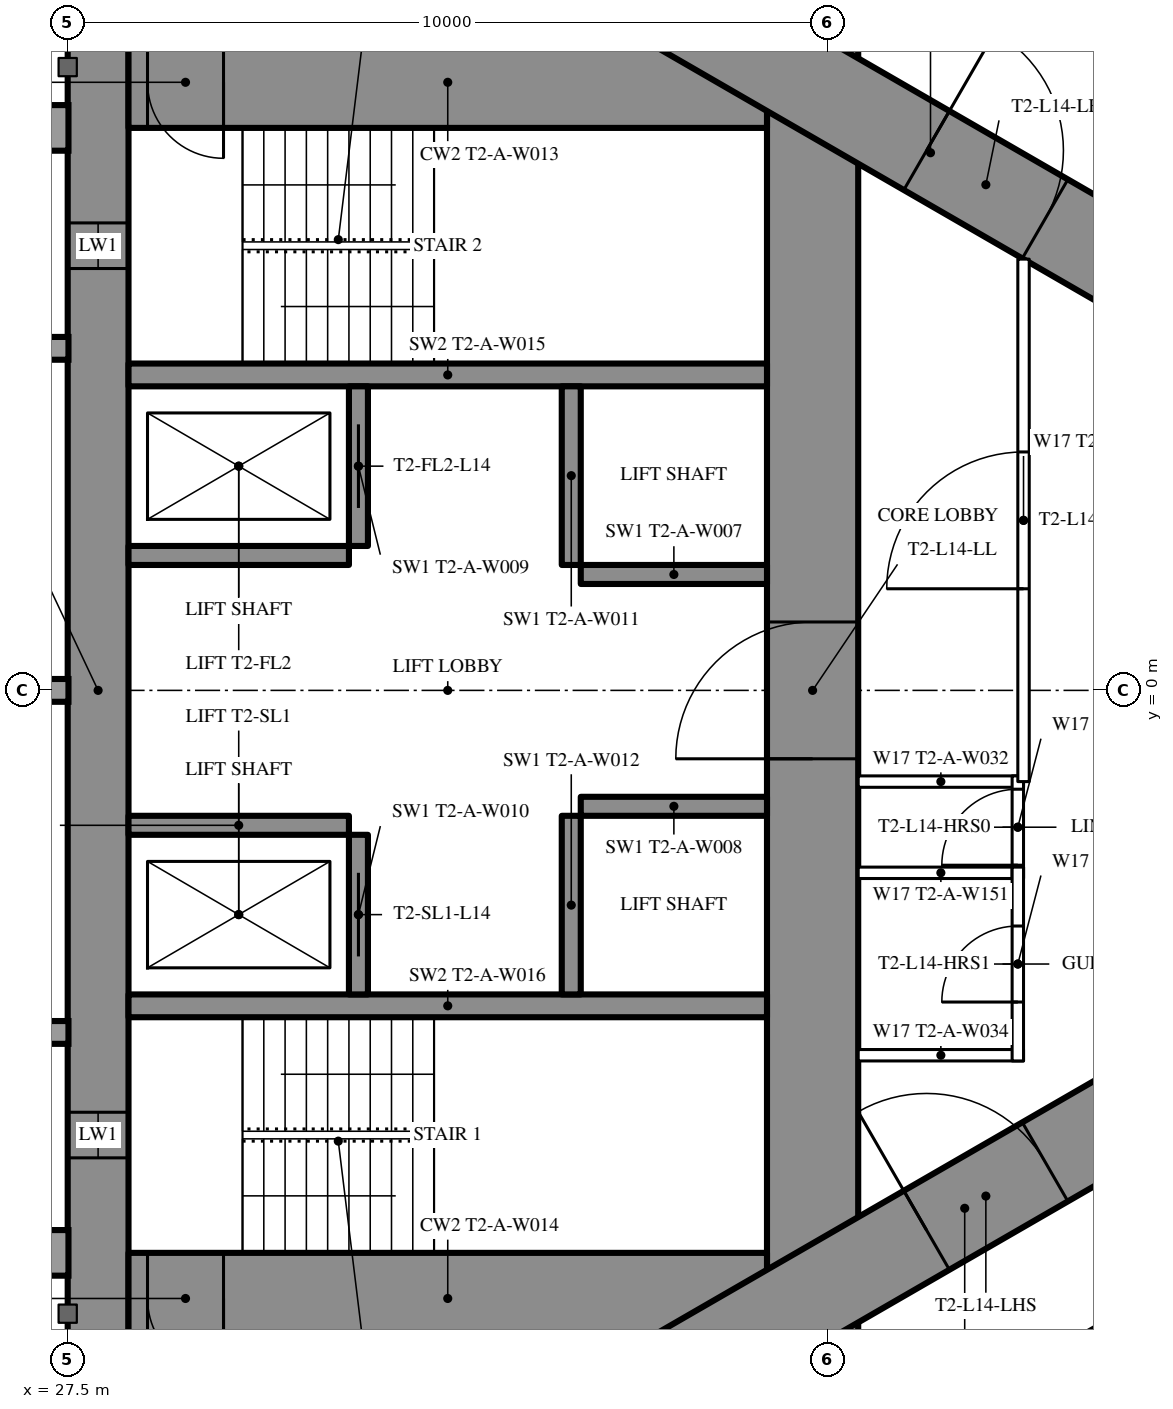
"""IFC4 building model, lengths in metres.
Left out: names, types, materials, properties, quantities, classifications, styles, units other than length and angle.
Written with IfcOpenShell. Run it as: python <this file> out.ifc"""

import sys

from ifc_helpers import new_model, si_unit, direction, frame, frame_2d, origin, place, context, subcontext, project, spatial, rectangle, extrude, element, fill, save


model = new_model("IFC4")
c1 = context("Model", 3, precision=1e-05, world=origin(), true_north=direction((0.0, 1.0)))
c2 = subcontext(c1, "Body", "Model", "MODEL_VIEW")
j1 = project(units=[si_unit("LENGTHUNIT", "METRE"), si_unit("PLANEANGLEUNIT", "RADIAN")], contexts=[c1])
p1 = place(None, origin())
s1 = spatial("IfcSite", under=j1, at=p1, CompositionType="ELEMENT")
p2 = place(p1, origin())
s2 = spatial("IfcBuilding", under=s1, at=p2, CompositionType="ELEMENT")
p3 = place(p2, frame((0.0, 0.0, 56.5)))
s3 = spatial("IfcBuildingStorey", under=s2, at=p3, CompositionType="ELEMENT", Elevation=56.5)
p4 = place(p3, frame((27.9, -8.6, 0.0), z_axis=(0.0, 0.0, 1.0), x_axis=(0.0, 1.0, 0.0)))
e1 = element("IfcWall", 1, at=p4, inside=s3, PredefinedType="SHEAR", context=c2, shape_type="SweptSolid", body=[
    extrude(rectangle(XDim=17.2, YDim=0.8, at=frame_2d((8.6, 0.0))), origin(), (0.0, 0.0, 1.0), 3.5),
])
p5 = place(p4, frame((2.45, 0.0, 0.6)))
e2 = element("IfcOpeningElement", 2, at=p5, cuts=e1, PredefinedType="OPENING", context=c2, shape_type="SweptSolid", body=[
    extrude(rectangle(XDim=0.6, YDim=2.1, at=frame_2d((0.3, 1.05))), frame((0.0, 0.41, 0.0), z_axis=(0.0, -1.0, 0.0), x_axis=(1.0, 0.0, 0.0)), (0.0, 0.0, 1.0), 0.82),
])
p6 = place(p4, frame((14.15, 0.0, 0.6)))
e3 = element("IfcOpeningElement", 3, at=p6, cuts=e1, PredefinedType="OPENING", context=c2, shape_type="SweptSolid", body=[
    extrude(rectangle(XDim=0.6, YDim=2.1, at=frame_2d((0.3, 1.05))), frame((0.0, 0.41, 0.0), z_axis=(0.0, -1.0, 0.0), x_axis=(1.0, 0.0, 0.0)), (0.0, 0.0, 1.0), 0.82),
])
p7 = place(p3, frame((37.3, -8.6, 0.0), z_axis=(0.0, 0.0, 1.0), x_axis=(0.0, 1.0, 0.0)))
e4 = element("IfcWall", 4, at=p7, inside=s3, PredefinedType="SHEAR", context=c2, shape_type="SweptSolid", body=[
    extrude(rectangle(XDim=17.2, YDim=1.2, at=frame_2d((8.6, 0.0))), origin(), (0.0, 0.0, 1.0), 3.5),
])
p8 = place(p7, frame((7.7, 0.0, 0.0)))
e5 = element("IfcOpeningElement", 5, at=p8, cuts=e4, PredefinedType="OPENING", context=c2, shape_type="SweptSolid", body=[
    extrude(rectangle(XDim=1.8, YDim=2.2, at=frame_2d((0.9, 1.1))), frame((0.0, 0.61, 0.0), z_axis=(0.0, -1.0, 0.0), x_axis=(1.0, 0.0, 0.0)), (0.0, 0.0, 1.0), 1.22),
])
p9 = place(p3, frame((28.3, -8.0, 0.0), z_axis=(0.0, 0.0, 1.0), x_axis=(1.0, 0.0, 0.0)))
e6 = element("IfcWall", 6, at=p9, inside=s3, PredefinedType="SHEAR", context=c2, shape_type="SweptSolid", body=[
    extrude(rectangle(XDim=8.4, YDim=1.2, at=frame_2d((4.2, 0.0))), origin(), (0.0, 0.0, 1.0), 3.5),
])
p10 = place(p9, frame((0.25, 0.0, 0.0)))
e7 = element("IfcOpeningElement", 7, at=p10, cuts=e6, PredefinedType="OPENING", context=c2, shape_type="SweptSolid", body=[
    extrude(rectangle(XDim=1.0, YDim=2.2, at=frame_2d((0.5, 1.1))), frame((0.0, 0.61, 0.0), z_axis=(0.0, -1.0, 0.0), x_axis=(1.0, 0.0, 0.0)), (0.0, 0.0, 1.0), 1.22),
])
p11 = place(p3, frame((28.3, 8.0, 0.0), z_axis=(0.0, 0.0, 1.0), x_axis=(1.0, 0.0, 0.0)))
e8 = element("IfcWall", 8, at=p11, inside=s3, PredefinedType="SHEAR", context=c2, shape_type="SweptSolid", body=[
    extrude(rectangle(XDim=8.4, YDim=1.2, at=frame_2d((4.2, 0.0))), origin(), (0.0, 0.0, 1.0), 3.5),
])
p12 = place(p11, frame((0.25, 0.0, 0.0)))
e9 = element("IfcOpeningElement", 9, at=p12, cuts=e8, PredefinedType="OPENING", context=c2, shape_type="SweptSolid", body=[
    extrude(rectangle(XDim=1.0, YDim=2.2, at=frame_2d((0.5, 1.1))), frame((0.0, 0.61, 0.0), z_axis=(0.0, -1.0, 0.0), x_axis=(1.0, 0.0, 0.0)), (0.0, 0.0, 1.0), 1.22),
])
for number, where, z_axis, x_axis in (
    (10, (28.3, -4.15, 0.0), (0.0, 0.0, 1.0), (1.0, 0.0, 0.0)),
    (11, (28.3, 4.15, 0.0), (0.0, 0.0, 1.0), (1.0, 0.0, 0.0)),
):
    element("IfcWall", number, at=place(p3, frame(where, z_axis=z_axis, x_axis=x_axis)), inside=s3, PredefinedType="SHEAR", context=c2, shape_type="SweptSolid", body=[
        extrude(rectangle(XDim=8.4, YDim=0.3, at=frame_2d((4.2, 0.0))), origin(), (0.0, 0.0, 1.0), 3.5),
    ])
p13 = place(p3, frame((31.325, -4.0, 0.0), z_axis=(0.0, 0.0, 1.0), x_axis=(0.0, 1.0, 0.0)))
e12 = element("IfcWall", 12, at=p13, inside=s3, PredefinedType="SHEAR", context=c2, shape_type="SweptSolid", body=[
    extrude(rectangle(XDim=2.1, YDim=0.25, at=frame_2d((1.05, 0.0))), origin(), (0.0, 0.0, 1.0), 3.5),
])
p14 = place(p13, frame((0.5, 0.0, 0.0)))
e13 = element("IfcOpeningElement", 13, at=p14, cuts=e12, PredefinedType="OPENING", context=c2, shape_type="SweptSolid", body=[
    extrude(rectangle(XDim=1.1, YDim=2.2, at=frame_2d((0.55, 1.1))), frame((0.0, 0.135, 0.0), z_axis=(0.0, -1.0, 0.0), x_axis=(1.0, 0.0, 0.0)), (0.0, 0.0, 1.0), 0.27),
])
p15 = place(p3, frame((34.125, -4.0, 0.0), z_axis=(0.0, 0.0, 1.0), x_axis=(0.0, 1.0, 0.0)))
e14 = element("IfcWall", 14, at=p15, inside=s3, PredefinedType="SHEAR", context=c2, shape_type="SweptSolid", body=[
    extrude(rectangle(XDim=2.35, YDim=0.25, at=frame_2d((1.175, 0.0))), origin(), (0.0, 0.0, 1.0), 3.5),
])
p16 = place(p3, frame((28.3, -1.775, 0.0), z_axis=(0.0, 0.0, 1.0), x_axis=(1.0, 0.0, 0.0)))
e15 = element("IfcWall", 15, at=p16, inside=s3, PredefinedType="SHEAR", context=c2, shape_type="SweptSolid", body=[
    extrude(rectangle(XDim=2.9, YDim=0.25, at=frame_2d((1.45, 0.0))), origin(), (0.0, 0.0, 1.0), 3.5),
])
p17 = place(p3, frame((34.25, -1.525, 0.0), z_axis=(0.0, 0.0, 1.0), x_axis=(1.0, 0.0, 0.0)))
e16 = element("IfcWall", 16, at=p17, inside=s3, PredefinedType="SHEAR", context=c2, shape_type="SweptSolid", body=[
    extrude(rectangle(XDim=2.45, YDim=0.25, at=frame_2d((1.225, 0.0))), origin(), (0.0, 0.0, 1.0), 3.5),
])
p18 = place(p3, frame((31.325, 1.9, 0.0), z_axis=(0.0, 0.0, 1.0), x_axis=(0.0, 1.0, 0.0)))
e17 = element("IfcWall", 17, at=p18, inside=s3, PredefinedType="SHEAR", context=c2, shape_type="SweptSolid", body=[
    extrude(rectangle(XDim=2.1, YDim=0.25, at=frame_2d((1.05, 0.0))), origin(), (0.0, 0.0, 1.0), 3.5),
])
p19 = place(p18, frame((0.5, 0.0, 0.0)))
e18 = element("IfcOpeningElement", 18, at=p19, cuts=e17, PredefinedType="OPENING", context=c2, shape_type="SweptSolid", body=[
    extrude(rectangle(XDim=1.1, YDim=2.2, at=frame_2d((0.55, 1.1))), frame((0.0, 0.135, 0.0), z_axis=(0.0, -1.0, 0.0), x_axis=(1.0, 0.0, 0.0)), (0.0, 0.0, 1.0), 0.27),
])
p20 = place(p3, frame((34.125, 1.65, 0.0), z_axis=(0.0, 0.0, 1.0), x_axis=(0.0, 1.0, 0.0)))
e19 = element("IfcWall", 19, at=p20, inside=s3, PredefinedType="SHEAR", context=c2, shape_type="SweptSolid", body=[
    extrude(rectangle(XDim=2.35, YDim=0.25, at=frame_2d((1.175, 0.0))), origin(), (0.0, 0.0, 1.0), 3.5),
])
p21 = place(p3, frame((28.3, 1.775, 0.0), z_axis=(0.0, 0.0, 1.0), x_axis=(1.0, 0.0, 0.0)))
e20 = element("IfcWall", 20, at=p21, inside=s3, PredefinedType="SHEAR", context=c2, shape_type="SweptSolid", body=[
    extrude(rectangle(XDim=2.9, YDim=0.25, at=frame_2d((1.45, 0.0))), origin(), (0.0, 0.0, 1.0), 3.5),
])
p22 = place(p3, frame((34.25, 1.525, 0.0), z_axis=(0.0, 0.0, 1.0), x_axis=(1.0, 0.0, 0.0)))
e21 = element("IfcWall", 21, at=p22, inside=s3, PredefinedType="SHEAR", context=c2, shape_type="SweptSolid", body=[
    extrude(rectangle(XDim=2.45, YDim=0.25, at=frame_2d((1.225, 0.0))), origin(), (0.0, 0.0, 1.0), 3.5),
])
p23 = place(p3, frame((27.2, -13.8, 0.0), z_axis=(0.0, 0.0, 1.0), x_axis=(0.866027159892, 0.499996958321, 0.0)))
e22 = element("IfcWall", 22, at=p23, inside=s3, PredefinedType="SHEAR", context=c2, shape_type="SweptSolid", body=[
    extrude(rectangle(XDim=27.947, YDim=1.2, at=frame_2d((13.973, 0.0))), origin(), (0.0, 0.0, 1.0), 3.5),
])
p24 = place(p23, frame((4.6, 0.0, 0.0)))
e23 = element("IfcOpeningElement", 23, at=p24, cuts=e22, PredefinedType="OPENING", context=c2, shape_type="SweptSolid", body=[
    extrude(rectangle(XDim=1.0, YDim=2.2, at=frame_2d((0.5, 1.1))), frame((0.0, 0.61, 0.0), z_axis=(0.0, -1.0, 0.0), x_axis=(1.0, 0.0, 0.0)), (0.0, 0.0, 1.0), 1.22),
])
p25 = place(p23, frame((13.395, 0.0, 0.0)))
e24 = element("IfcOpeningElement", 24, at=p25, cuts=e22, PredefinedType="OPENING", context=c2, shape_type="SweptSolid", body=[
    extrude(rectangle(XDim=1.8, YDim=2.2, at=frame_2d((0.9, 1.1))), frame((0.0, 0.61, 0.0), z_axis=(0.0, -1.0, 0.0), x_axis=(1.0, 0.0, 0.0)), (0.0, 0.0, 1.0), 1.22),
])
p26 = place(p3, frame((27.2, 13.8, 0.0), z_axis=(0.0, 0.0, 1.0), x_axis=(0.866024515034, -0.500001539357, 0.0)))
e25 = element("IfcWall", 25, at=p26, inside=s3, PredefinedType="SHEAR", context=c2, shape_type="SweptSolid", body=[
    extrude(rectangle(XDim=26.907, YDim=1.2, at=frame_2d((13.454, 0.0))), origin(), (0.0, 0.0, 1.0), 3.5),
])
p27 = place(p26, frame((4.6, 0.0, 0.0)))
e26 = element("IfcOpeningElement", 26, at=p27, cuts=e25, PredefinedType="OPENING", context=c2, shape_type="SweptSolid", body=[
    extrude(rectangle(XDim=1.0, YDim=2.2, at=frame_2d((0.5, 1.1))), frame((0.0, 0.61, 0.0), z_axis=(0.0, -1.0, 0.0), x_axis=(1.0, 0.0, 0.0)), (0.0, 0.0, 1.0), 1.22),
])
p28 = place(p26, frame((13.395, 0.0, 0.0)))
e27 = element("IfcOpeningElement", 27, at=p28, cuts=e25, PredefinedType="OPENING", context=c2, shape_type="SweptSolid", body=[
    extrude(rectangle(XDim=1.8, YDim=2.2, at=frame_2d((0.9, 1.1))), frame((0.0, 0.61, 0.0), z_axis=(0.0, -1.0, 0.0), x_axis=(1.0, 0.0, 0.0)), (0.0, 0.0, 1.0), 1.22),
])
p29 = place(p3, frame((36.834, 10.894, 0.0), z_axis=(0.0, 0.0, 1.0), x_axis=(0.866028157229, -0.499995230863, 0.0)))
e28 = element("IfcWall", 28, at=p29, inside=s3, PredefinedType="PARTITIONING", context=c2, shape_type="SweptSolid", body=[
    extrude(rectangle(XDim=21.667, YDim=0.2, at=frame_2d((10.833, 0.0))), origin(), (0.0, 0.0, 1.0), 3.25),
])
p30 = place(p29, frame((14.55, 0.0, 0.0)))
e29 = element("IfcOpeningElement", 29, at=p30, cuts=e28, PredefinedType="OPENING", context=c2, shape_type="SweptSolid", body=[
    extrude(rectangle(XDim=0.95, YDim=2.2, at=frame_2d((0.475, 1.1))), frame((0.0, 0.11, 0.0), z_axis=(0.0, -1.0, 0.0), x_axis=(1.0, 0.0, 0.0)), (0.0, 0.0, 1.0), 0.22),
])
p31 = place(p29, frame((10.5, 0.0, 0.0)))
e30 = element("IfcOpeningElement", 30, at=p31, cuts=e28, PredefinedType="OPENING", context=c2, shape_type="SweptSolid", body=[
    extrude(rectangle(XDim=0.95, YDim=2.2, at=frame_2d((0.475, 1.1))), frame((0.0, 0.11, 0.0), z_axis=(0.0, -1.0, 0.0), x_axis=(1.0, 0.0, 0.0)), (0.0, 0.0, 1.0), 0.22),
])
p32 = place(p29, frame((4.292, 0.0, 0.0)))
e31 = element("IfcOpeningElement", 31, at=p32, cuts=e28, PredefinedType="OPENING", context=c2, shape_type="SweptSolid", body=[
    extrude(rectangle(XDim=1.0, YDim=2.2, at=frame_2d((0.5, 1.1))), frame((0.0, 0.11, 0.0), z_axis=(0.0, -1.0, 0.0), x_axis=(1.0, 0.0, 0.0)), (0.0, 0.0, 1.0), 0.22),
])
p33 = place(p29, frame((0.246, 0.0, 0.0)))
e32 = element("IfcOpeningElement", 32, at=p33, cuts=e28, PredefinedType="OPENING", context=c2, shape_type="SweptSolid", body=[
    extrude(rectangle(XDim=0.9, YDim=2.2, at=frame_2d((0.45, 1.1))), frame((0.0, 0.11, 0.0), z_axis=(0.0, -1.0, 0.0), x_axis=(1.0, 0.0, 0.0)), (0.0, 0.0, 1.0), 0.22),
])
p34 = place(p3, frame((37.96, -10.243, 0.0), z_axis=(0.0, 0.0, 1.0), x_axis=(0.866030548046, 0.499991089772, 0.0)))
e33 = element("IfcWall", 33, at=p34, inside=s3, PredefinedType="PARTITIONING", context=c2, shape_type="SweptSolid", body=[
    extrude(rectangle(XDim=12.849, YDim=0.2, at=frame_2d((6.425, 0.0))), origin(), (0.0, 0.0, 1.0), 3.25),
])
p35 = place(p34, frame((4.575, 0.0, 0.0)))
e34 = element("IfcOpeningElement", 34, at=p35, cuts=e33, PredefinedType="OPENING", context=c2, shape_type="SweptSolid", body=[
    extrude(rectangle(XDim=0.95, YDim=2.2, at=frame_2d((0.475, 1.1))), frame((0.0, 0.11, 0.0), z_axis=(0.0, -1.0, 0.0), x_axis=(1.0, 0.0, 0.0)), (0.0, 0.0, 1.0), 0.22),
])
p36 = place(p34, frame((0.6, 0.0, 0.0)))
e35 = element("IfcOpeningElement", 35, at=p36, cuts=e33, PredefinedType="OPENING", context=c2, shape_type="SweptSolid", body=[
    extrude(rectangle(XDim=0.95, YDim=2.2, at=frame_2d((0.475, 1.1))), frame((0.0, 0.11, 0.0), z_axis=(0.0, -1.0, 0.0), x_axis=(1.0, 0.0, 0.0)), (0.0, 0.0, 1.0), 0.22),
])
for number, where, z_axis, x_axis in (
    (36, (37.9, -1.2, 0.0), (0.0, 0.0, 1.0), (1.0, 0.0, 0.0)),
    (37, (37.9, -2.4, 0.0), (0.0, 0.0, 1.0), (1.0, 0.0, 0.0)),
    (38, (37.9, -4.8, 0.0), (0.0, 0.0, 1.0), (1.0, 0.0, 0.0)),
):
    element("IfcWall", number, at=place(p3, frame(where, z_axis=z_axis, x_axis=x_axis)), inside=s3, PredefinedType="PARTITIONING", context=c2, shape_type="SweptSolid", body=[
        extrude(rectangle(XDim=2.175, YDim=0.15, at=frame_2d((1.087, 0.0))), origin(), (0.0, 0.0, 1.0), 3.25),
    ])
p37 = place(p3, frame((40.0, -2.475, 0.0), z_axis=(0.0, 0.0, 1.0), x_axis=(0.0, 1.0, 0.0)))
e39 = element("IfcWall", 39, at=p37, inside=s3, PredefinedType="PARTITIONING", context=c2, shape_type="SweptSolid", body=[
    extrude(rectangle(XDim=1.35, YDim=0.15, at=frame_2d((0.675, 0.0))), origin(), (0.0, 0.0, 1.0), 3.25),
])
p38 = place(p37, frame((0.175, 0.0, 0.0)))
e40 = element("IfcOpeningElement", 40, at=p38, cuts=e39, PredefinedType="OPENING", context=c2, shape_type="SweptSolid", body=[
    extrude(rectangle(XDim=1.0, YDim=2.2, at=frame_2d((0.5, 1.1))), frame((0.0, 0.085, 0.0), z_axis=(0.0, -1.0, 0.0), x_axis=(1.0, 0.0, 0.0)), (0.0, 0.0, 1.0), 0.17),
])
p39 = place(p3, frame((40.0, -4.875, 0.0), z_axis=(0.0, 0.0, 1.0), x_axis=(0.0, 1.0, 0.0)))
e41 = element("IfcWall", 41, at=p39, inside=s3, PredefinedType="PARTITIONING", context=c2, shape_type="SweptSolid", body=[
    extrude(rectangle(XDim=2.55, YDim=0.15, at=frame_2d((1.275, 0.0))), origin(), (0.0, 0.0, 1.0), 3.25),
])
p40 = place(p39, frame((0.775, 0.0, 0.0)))
e42 = element("IfcOpeningElement", 42, at=p40, cuts=e41, PredefinedType="OPENING", context=c2, shape_type="SweptSolid", body=[
    extrude(rectangle(XDim=1.0, YDim=2.2, at=frame_2d((0.5, 1.1))), frame((0.0, 0.085, 0.0), z_axis=(0.0, -1.0, 0.0), x_axis=(1.0, 0.0, 0.0)), (0.0, 0.0, 1.0), 0.17),
])
p41 = place(p3, frame((40.075, -1.2, 0.0), z_axis=(0.0, 0.0, 1.0), x_axis=(0.0, 1.0, 0.0)))
e43 = element("IfcWall", 43, at=p41, inside=s3, PredefinedType="PARTITIONING", context=c2, shape_type="SweptSolid", body=[
    extrude(rectangle(XDim=6.874, YDim=0.15, at=frame_2d((3.437, 0.0))), origin(), (0.0, 0.0, 1.0), 3.25),
])
p42 = place(p41, frame((2.537, 0.0, 0.0)))
e44 = element("IfcOpeningElement", 44, at=p42, cuts=e43, PredefinedType="OPENING", context=c2, shape_type="SweptSolid", body=[
    extrude(rectangle(XDim=1.8, YDim=2.2, at=frame_2d((0.9, 1.1))), frame((0.0, 0.085, 0.0), z_axis=(0.0, -1.0, 0.0), x_axis=(1.0, 0.0, 0.0)), (0.0, 0.0, 1.0), 0.17),
])
p43 = place(p32, origin())
e45 = element("IfcDoor", 45, at=p43, inside=s3, OperationType="SINGLE_SWING_LEFT", PredefinedType="DOOR", context=c2, shape_type="SweptSolid", body=[
    extrude(rectangle(XDim=1.0, YDim=2.2, at=frame_2d((0.5, 1.1))), frame((0.0, 0.025, 0.0), z_axis=(0.0, -1.0, 0.0), x_axis=(1.0, 0.0, 0.0)), (0.0, 0.0, 1.0), 0.05),
])
fill(e31, e45)
p44 = place(p38, origin())
e46 = element("IfcDoor", 46, at=p44, inside=s3, OperationType="SINGLE_SWING_LEFT", PredefinedType="DOOR", context=c2, shape_type="SweptSolid", body=[
    extrude(rectangle(XDim=1.0, YDim=2.2, at=frame_2d((0.5, 1.1))), frame((0.0, 0.025, 0.0), z_axis=(0.0, -1.0, 0.0), x_axis=(1.0, 0.0, 0.0)), (0.0, 0.0, 1.0), 0.05),
])
fill(e40, e46)
p45 = place(p40, origin())
e47 = element("IfcDoor", 47, at=p45, inside=s3, OperationType="SINGLE_SWING_LEFT", PredefinedType="DOOR", context=c2, shape_type="SweptSolid", body=[
    extrude(rectangle(XDim=1.0, YDim=2.2, at=frame_2d((0.5, 1.1))), frame((0.0, 0.025, 0.0), z_axis=(0.0, -1.0, 0.0), x_axis=(1.0, 0.0, 0.0)), (0.0, 0.0, 1.0), 0.05),
])
fill(e42, e47)
p46 = place(p42, origin())
e48 = element("IfcDoor", 48, at=p46, inside=s3, OperationType="DOUBLE_DOOR_SINGLE_SWING", PredefinedType="DOOR", context=c2, shape_type="SweptSolid", body=[
    extrude(rectangle(XDim=1.8, YDim=2.2, at=frame_2d((0.9, 1.1))), frame((0.0, 0.025, 0.0), z_axis=(0.0, -1.0, 0.0), x_axis=(1.0, 0.0, 0.0)), (0.0, 0.0, 1.0), 0.05),
])
fill(e44, e48)
p47 = place(p25, origin())
e49 = element("IfcDoor", 49, at=p47, inside=s3, OperationType="DOUBLE_DOOR_SINGLE_SWING", PredefinedType="DOOR", context=c2, shape_type="SweptSolid", body=[
    extrude(rectangle(XDim=1.8, YDim=2.2, at=frame_2d((0.9, 1.1))), frame((0.0, 0.025, 0.0), z_axis=(0.0, -1.0, 0.0), x_axis=(1.0, 0.0, 0.0)), (0.0, 0.0, 1.0), 0.05),
])
fill(e24, e49)
p48 = place(p28, origin())
e50 = element("IfcDoor", 50, at=p48, inside=s3, OperationType="DOUBLE_DOOR_SINGLE_SWING", PredefinedType="DOOR", context=c2, shape_type="SweptSolid", body=[
    extrude(rectangle(XDim=1.8, YDim=2.2, at=frame_2d((0.9, 1.1))), frame((0.0, 0.025, 0.0), z_axis=(0.0, -1.0, 0.0), x_axis=(1.0, 0.0, 0.0)), (0.0, 0.0, 1.0), 0.05),
])
fill(e27, e50)
p49 = place(p8, origin())
e51 = element("IfcDoor", 51, at=p49, inside=s3, OperationType="DOUBLE_DOOR_SINGLE_SWING", PredefinedType="DOOR", context=c2, shape_type="SweptSolid", body=[
    extrude(rectangle(XDim=1.8, YDim=2.2, at=frame_2d((0.9, 1.1))), frame((0.0, 0.025, 0.0), z_axis=(0.0, -1.0, 0.0), x_axis=(1.0, 0.0, 0.0)), (0.0, 0.0, 1.0), 0.05),
])
fill(e5, e51)
p50 = place(p10, origin())
e52 = element("IfcDoor", 52, at=p50, inside=s3, OperationType="SINGLE_SWING_RIGHT", PredefinedType="DOOR", context=c2, shape_type="SweptSolid", body=[
    extrude(rectangle(XDim=1.0, YDim=2.2, at=frame_2d((0.5, 1.1))), frame((0.0, 0.025, 0.0), z_axis=(0.0, -1.0, 0.0), x_axis=(1.0, 0.0, 0.0)), (0.0, 0.0, 1.0), 0.05),
])
fill(e7, e52)
p51 = place(p12, origin())
e53 = element("IfcDoor", 53, at=p51, inside=s3, OperationType="SINGLE_SWING_RIGHT", PredefinedType="DOOR", context=c2, shape_type="SweptSolid", body=[
    extrude(rectangle(XDim=1.0, YDim=2.2, at=frame_2d((0.5, 1.1))), frame((0.0, 0.025, 0.0), z_axis=(0.0, -1.0, 0.0), x_axis=(1.0, 0.0, 0.0)), (0.0, 0.0, 1.0), 0.05),
])
fill(e9, e53)
p52 = place(p14, origin())
e54 = element("IfcDoor", 54, at=p52, inside=s3, OperationType="SLIDING_TO_LEFT", PredefinedType="USERDEFINED", context=c2, shape_type="SweptSolid", body=[
    extrude(rectangle(XDim=1.1, YDim=2.2, at=frame_2d((0.55, 1.1))), frame((0.0, 0.025, 0.0), z_axis=(0.0, -1.0, 0.0), x_axis=(1.0, 0.0, 0.0)), (0.0, 0.0, 1.0), 0.05),
])
fill(e13, e54)
p53 = place(p19, origin())
e55 = element("IfcDoor", 55, at=p53, inside=s3, OperationType="SLIDING_TO_LEFT", PredefinedType="USERDEFINED", context=c2, shape_type="SweptSolid", body=[
    extrude(rectangle(XDim=1.1, YDim=2.2, at=frame_2d((0.55, 1.1))), frame((0.0, 0.025, 0.0), z_axis=(0.0, -1.0, 0.0), x_axis=(1.0, 0.0, 0.0)), (0.0, 0.0, 1.0), 0.05),
])
fill(e18, e55)
p54 = place(p5, origin())
e56 = element("IfcWindow", 56, at=p54, inside=s3, PartitioningType="SINGLE_PANEL", PredefinedType="WINDOW", context=c2, shape_type="SweptSolid", body=[
    extrude(rectangle(XDim=0.6, YDim=2.1, at=frame_2d((0.3, 1.05))), frame((0.0, 0.03, 0.0), z_axis=(0.0, -1.0, 0.0), x_axis=(1.0, 0.0, 0.0)), (0.0, 0.0, 1.0), 0.06),
])
fill(e2, e56)
p55 = place(p6, origin())
e57 = element("IfcWindow", 57, at=p55, inside=s3, PartitioningType="SINGLE_PANEL", PredefinedType="WINDOW", context=c2, shape_type="SweptSolid", body=[
    extrude(rectangle(XDim=0.6, YDim=2.1, at=frame_2d((0.3, 1.05))), frame((0.0, 0.03, 0.0), z_axis=(0.0, -1.0, 0.0), x_axis=(1.0, 0.0, 0.0)), (0.0, 0.0, 1.0), 0.06),
])
fill(e3, e57)
save(model, sys.argv[1])
